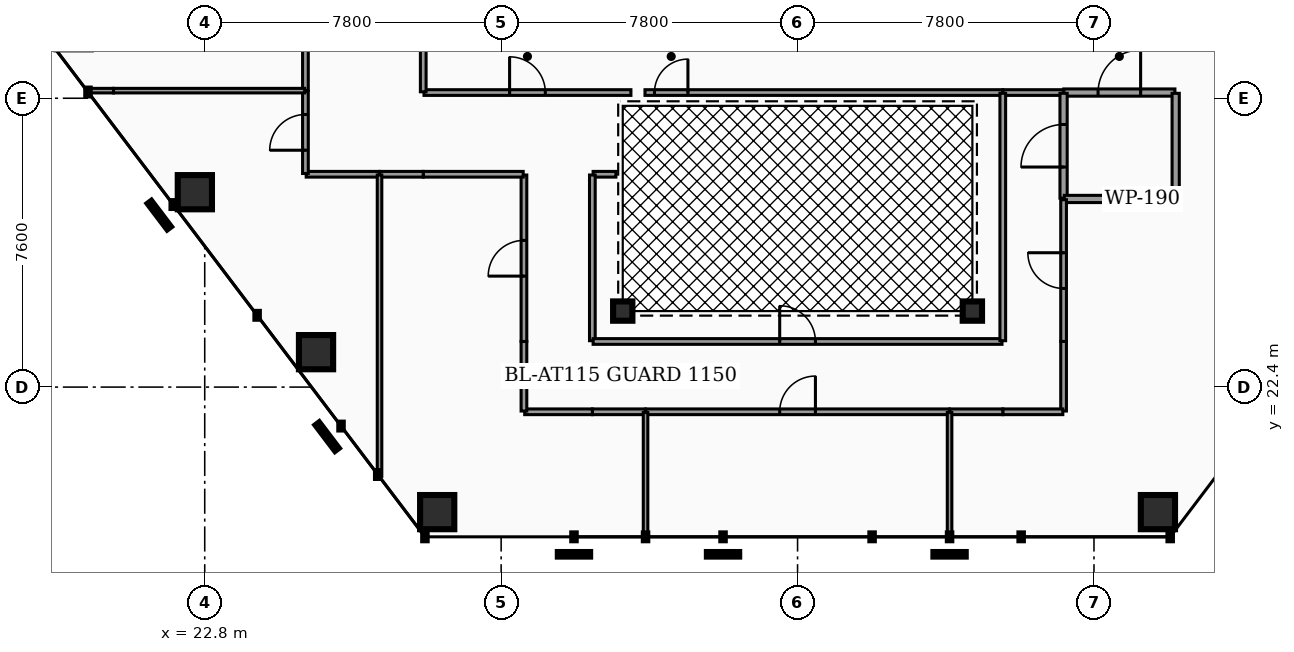
"""IFC4 building model, lengths in metres.
Left out: names, types, materials, properties, quantities, classifications, styles, units other than length and angle.
Written with IfcOpenShell. Run it as: python <this file> out.ifc"""

import sys

from ifc_helpers import new_model, si_unit, direction, frame, frame_2d, origin, origin_2d, place, context, subcontext, project, spatial, rectangle, hollow_rectangle, hollow_circle, extrude, element, fill, save


model = new_model("IFC4")
c1 = context("Model", 3, precision=1e-05, world=origin(), true_north=direction((0.0, 1.0)))
c2 = subcontext(c1, "Body", "Model", "MODEL_VIEW")
j1 = project(units=[si_unit("LENGTHUNIT", "METRE"), si_unit("PLANEANGLEUNIT", "RADIAN")], contexts=[c1])
p1 = place(None, origin())
s1 = spatial("IfcSite", under=j1, at=p1, CompositionType="ELEMENT")
p2 = place(p1, origin())
s2 = spatial("IfcBuilding", under=s1, at=p2, CompositionType="ELEMENT")
p3 = place(p2, frame((0.0, 0.0, 88.74)))
s3 = spatial("IfcBuildingStorey", under=s2, at=p3, CompositionType="ELEMENT", Elevation=88.74)
for number, where, z_axis, x_axis in (
    (1, (22.54, 27.528, 0.0), (0.0, 0.0, 1.0), (1.0, 0.0, 0.0)),
    (2, (25.729, 23.319, 0.0), (0.0, 0.0, 1.0), (1.0, 0.0, 0.0)),
    (3, (28.917, 19.11, 0.0), (0.0, 0.0, 1.0), (1.0, 0.0, 0.0)),
    (4, (47.883, 19.11, 0.0), (0.0, 0.0, 1.0), (1.0, 0.0, 0.0)),
):
    element("IfcColumn", number, at=place(p3, frame(where, z_axis=z_axis, x_axis=x_axis)), inside=s3, PredefinedType="COLUMN", context=c2, shape_type="SweptSolid", body=[
        extrude(hollow_rectangle(XDim=0.9, YDim=0.9, WallThickness=0.045, at=origin_2d()), origin(), (0.0, 0.0, 1.0), 3.82),
    ])
for number, where, z_axis, x_axis in (
    (5, (33.8, 24.4, 0.0), (0.0, 0.0, 1.0), (1.0, 0.0, 0.0)),
    (6, (43.0, 24.4, 0.0), (0.0, 0.0, 1.0), (1.0, 0.0, 0.0)),
):
    element("IfcColumn", number, at=place(p3, frame(where, z_axis=z_axis, x_axis=x_axis)), inside=s3, PredefinedType="COLUMN", context=c2, shape_type="SweptSolid", body=[
        extrude(hollow_circle(Radius=0.254, WallThickness=0.02, at=origin_2d()), origin(), (0.0, 0.0, 1.0), 3.82),
    ])
p4 = place(p3, frame((45.405, 30.15, 0.0), z_axis=(0.0, 0.0, 1.0), x_axis=(1.0, 0.0, 0.0)))
e7 = element("IfcWall", 7, at=p4, inside=s3, PredefinedType="PARTITIONING", context=c2, shape_type="SweptSolid", body=[
    extrude(rectangle(XDim=2.925, YDim=0.19, at=frame_2d((1.462, 0.0))), origin(), (0.0, 0.0, 1.0), 2.777),
])
p5 = place(p4, frame((0.903, 0.0, 0.0)))
e8 = element("IfcOpeningElement", 8, at=p5, cuts=e7, PredefinedType="OPENING", context=c2, shape_type="SweptSolid", body=[
    extrude(rectangle(XDim=1.12, YDim=2.05, at=frame_2d((0.56, 1.025))), frame((0.0, 0.105, 0.0), z_axis=(0.0, -1.0, 0.0), x_axis=(1.0, 0.0, 0.0)), (0.0, 0.0, 1.0), 0.21),
])
p6 = place(p3, frame((43.805, 30.15, 0.0), z_axis=(0.0, 0.0, 1.0), x_axis=(1.0, 0.0, 0.0)))
e9 = element("IfcWall", 9, at=p6, inside=s3, PredefinedType="PARTITIONING", context=c2, shape_type="SweptSolid", body=[
    extrude(rectangle(XDim=1.59, YDim=0.15, at=frame_2d((0.795, 0.0))), origin(), (0.0, 0.0, 1.0), 2.777),
])
p7 = place(p3, frame((28.57, 30.15, 0.0), z_axis=(0.0, 0.0, 1.0), x_axis=(1.0, 0.0, 0.0)))
e10 = element("IfcWall", 10, at=p7, inside=s3, PredefinedType="PARTITIONING", context=c2, shape_type="SweptSolid", body=[
    extrude(rectangle(XDim=5.445, YDim=0.15, at=frame_2d((2.722, 0.0))), origin(), (0.0, 0.0, 1.0), 2.777),
])
p8 = place(p7, frame((2.252, 0.0, 0.0)))
e11 = element("IfcOpeningElement", 11, at=p8, cuts=e10, PredefinedType="OPENING", context=c2, shape_type="SweptSolid", body=[
    extrude(rectangle(XDim=0.94, YDim=2.05, at=frame_2d((0.47, 1.025))), frame((0.0, 0.085, 0.0), z_axis=(0.0, -1.0, 0.0), x_axis=(1.0, 0.0, 0.0)), (0.0, 0.0, 1.0), 0.17),
])
p9 = place(p3, frame((28.55, 30.17, 0.0), z_axis=(0.0, 0.0, 1.0), x_axis=(0.0, 1.0, 0.0)))
e12 = element("IfcWall", 12, at=p9, inside=s3, PredefinedType="PARTITIONING", context=c2, shape_type="SweptSolid", body=[
    extrude(rectangle(XDim=3.065, YDim=0.15, at=frame_2d((1.533, 0.0))), origin(), (0.0, 0.0, 1.0), 2.777),
])
p10 = place(p3, frame((34.385, 30.15, 0.0), z_axis=(0.0, 0.0, 1.0), x_axis=(1.0, 0.0, 0.0)))
e13 = element("IfcWall", 13, at=p10, inside=s3, PredefinedType="PARTITIONING", context=c2, shape_type="SweptSolid", body=[
    extrude(rectangle(XDim=9.41, YDim=0.15, at=frame_2d((4.705, 0.0))), origin(), (0.0, 0.0, 1.0), 2.777),
])
p11 = place(p10, frame((0.25, 0.0, 0.0)))
e14 = element("IfcOpeningElement", 14, at=p11, cuts=e13, PredefinedType="OPENING", context=c2, shape_type="SweptSolid", body=[
    extrude(rectangle(XDim=0.88, YDim=2.05, at=frame_2d((0.44, 1.025))), frame((0.0, 0.085, 0.0), z_axis=(0.0, -1.0, 0.0), x_axis=(1.0, 0.0, 0.0)), (0.0, 0.0, 1.0), 0.17),
])
p12 = place(p3, frame((45.4, 27.37, 0.0), z_axis=(0.0, 0.0, 1.0), x_axis=(0.0, 1.0, 0.0)))
e15 = element("IfcWall", 15, at=p12, inside=s3, PredefinedType="PARTITIONING", context=c2, shape_type="SweptSolid", body=[
    extrude(rectangle(XDim=2.76, YDim=0.19, at=frame_2d((1.38, 0.0))), origin(), (0.0, 0.0, 1.0), 2.777),
])
p13 = place(p12, frame((0.82, 0.0, 0.0)))
e16 = element("IfcOpeningElement", 16, at=p13, cuts=e15, PredefinedType="OPENING", context=c2, shape_type="SweptSolid", body=[
    extrude(rectangle(XDim=1.12, YDim=2.05, at=frame_2d((0.56, 1.025))), frame((0.0, 0.105, 0.0), z_axis=(0.0, -1.0, 0.0), x_axis=(1.0, 0.0, 0.0)), (0.0, 0.0, 1.0), 0.21),
])
p14 = place(p3, frame((45.42, 27.35, 0.0), z_axis=(0.0, 0.0, 1.0), x_axis=(1.0, 0.0, 0.0)))
e17 = element("IfcWall", 17, at=p14, inside=s3, PredefinedType="PARTITIONING", context=c2, shape_type="SweptSolid", body=[
    extrude(rectangle(XDim=2.91, YDim=0.19, at=frame_2d((1.455, 0.0))), origin(), (0.0, 0.0, 1.0), 2.777),
])
p15 = place(p3, frame((48.35, 27.37, 0.0), z_axis=(0.0, 0.0, 1.0), x_axis=(0.0, 1.0, 0.0)))
e18 = element("IfcWall", 18, at=p15, inside=s3, PredefinedType="PARTITIONING", context=c2, shape_type="SweptSolid", body=[
    extrude(rectangle(XDim=2.76, YDim=0.19, at=frame_2d((1.38, 0.0))), origin(), (0.0, 0.0, 1.0), 2.777),
])
p16 = place(p3, frame((34.405, 21.75, 0.0), z_axis=(0.0, 0.0, 1.0), x_axis=(1.0, 0.0, 0.0)))
e19 = element("IfcWall", 19, at=p16, inside=s3, PredefinedType="PARTITIONING", context=c2, shape_type="SweptSolid", body=[
    extrude(rectangle(XDim=7.99, YDim=0.15, at=frame_2d((3.995, 0.0))), origin(), (0.0, 0.0, 1.0), 2.777),
])
p17 = place(p16, frame((3.525, 0.0, 0.0)))
e20 = element("IfcOpeningElement", 20, at=p17, cuts=e19, PredefinedType="OPENING", context=c2, shape_type="SweptSolid", body=[
    extrude(rectangle(XDim=0.94, YDim=2.05, at=frame_2d((0.47, 1.025))), frame((0.0, 0.085, 0.0), z_axis=(0.0, -1.0, 0.0), x_axis=(1.0, 0.0, 0.0)), (0.0, 0.0, 1.0), 0.17),
])
p18 = place(p3, frame((33.0, 21.75, 0.0), z_axis=(0.0, 0.0, 1.0), x_axis=(1.0, 0.0, 0.0)))
e21 = element("IfcWall", 21, at=p18, inside=s3, PredefinedType="PARTITIONING", context=c2, shape_type="SweptSolid", body=[
    extrude(rectangle(XDim=1.395, YDim=0.15, at=frame_2d((0.698, 0.0))), origin(), (0.0, 0.0, 1.0), 2.777),
])
p19 = place(p3, frame((31.22, 21.75, 0.0), z_axis=(0.0, 0.0, 1.0), x_axis=(1.0, 0.0, 0.0)))
e22 = element("IfcWall", 22, at=p19, inside=s3, PredefinedType="PARTITIONING", context=c2, shape_type="SweptSolid", body=[
    extrude(rectangle(XDim=1.78, YDim=0.15, at=frame_2d((0.89, 0.0))), origin(), (0.0, 0.0, 1.0), 2.777),
])
p20 = place(p3, frame((31.2, 21.77, 0.0), z_axis=(0.0, 0.0, 1.0), x_axis=(0.0, 1.0, 0.0)))
e23 = element("IfcWall", 23, at=p20, inside=s3, PredefinedType="PARTITIONING", context=c2, shape_type="SweptSolid", body=[
    extrude(rectangle(XDim=1.83, YDim=0.15, at=frame_2d((0.915, 0.0))), origin(), (0.0, 0.0, 1.0), 2.777),
])
p21 = place(p3, frame((31.2, 23.6, 0.0), z_axis=(0.0, 0.0, 1.0), x_axis=(0.0, 1.0, 0.0)))
e24 = element("IfcWall", 24, at=p21, inside=s3, PredefinedType="PARTITIONING", context=c2, shape_type="SweptSolid", body=[
    extrude(rectangle(XDim=4.38, YDim=0.15, at=frame_2d((2.19, 0.0))), origin(), (0.0, 0.0, 1.0), 2.777),
])
p22 = place(p21, frame((1.72, 0.0, 0.0)))
e25 = element("IfcOpeningElement", 25, at=p22, cuts=e24, PredefinedType="OPENING", context=c2, shape_type="SweptSolid", body=[
    extrude(rectangle(XDim=0.94, YDim=2.05, at=frame_2d((0.47, 1.025))), frame((0.0, 0.085, 0.0), z_axis=(0.0, -1.0, 0.0), x_axis=(1.0, 0.0, 0.0)), (0.0, 0.0, 1.0), 0.17),
])
p23 = place(p3, frame((28.55, 28.0, 0.0), z_axis=(0.0, 0.0, 1.0), x_axis=(1.0, 0.0, 0.0)))
e26 = element("IfcWall", 26, at=p23, inside=s3, PredefinedType="PARTITIONING", context=c2, shape_type="SweptSolid", body=[
    extrude(rectangle(XDim=2.63, YDim=0.15, at=frame_2d((1.315, 0.0))), origin(), (0.0, 0.0, 1.0), 2.777),
])
p24 = place(p3, frame((27.405, 28.0, 0.0), z_axis=(0.0, 0.0, 1.0), x_axis=(1.0, 0.0, 0.0)))
e27 = element("IfcWall", 27, at=p24, inside=s3, PredefinedType="PARTITIONING", context=c2, shape_type="SweptSolid", body=[
    extrude(rectangle(XDim=1.145, YDim=0.15, at=frame_2d((0.573, 0.0))), origin(), (0.0, 0.0, 1.0), 2.777),
])
p25 = place(p3, frame((45.4, 23.6, 0.0), z_axis=(0.0, 0.0, 1.0), x_axis=(0.0, 1.0, 0.0)))
e28 = element("IfcWall", 28, at=p25, inside=s3, PredefinedType="PARTITIONING", context=c2, shape_type="SweptSolid", body=[
    extrude(rectangle(XDim=3.73, YDim=0.15, at=frame_2d((1.865, 0.0))), origin(), (0.0, 0.0, 1.0), 2.777),
])
p26 = place(p25, frame((1.395, 0.0, 0.0)))
e29 = element("IfcOpeningElement", 29, at=p26, cuts=e28, PredefinedType="OPENING", context=c2, shape_type="SweptSolid", body=[
    extrude(rectangle(XDim=0.94, YDim=2.05, at=frame_2d((0.47, 1.025))), frame((0.0, 0.085, 0.0), z_axis=(0.0, -1.0, 0.0), x_axis=(1.0, 0.0, 0.0)), (0.0, 0.0, 1.0), 0.17),
])
p27 = place(p3, frame((45.4, 21.77, 0.0), z_axis=(0.0, 0.0, 1.0), x_axis=(0.0, 1.0, 0.0)))
e30 = element("IfcWall", 30, at=p27, inside=s3, PredefinedType="PARTITIONING", context=c2, shape_type="SweptSolid", body=[
    extrude(rectangle(XDim=1.83, YDim=0.15, at=frame_2d((0.915, 0.0))), origin(), (0.0, 0.0, 1.0), 2.777),
])
p28 = place(p3, frame((43.8, 21.75, 0.0), z_axis=(0.0, 0.0, 1.0), x_axis=(1.0, 0.0, 0.0)))
e31 = element("IfcWall", 31, at=p28, inside=s3, PredefinedType="PARTITIONING", context=c2, shape_type="SweptSolid", body=[
    extrude(rectangle(XDim=1.58, YDim=0.15, at=frame_2d((0.79, 0.0))), origin(), (0.0, 0.0, 1.0), 2.777),
])
p29 = place(p3, frame((42.405, 21.75, 0.0), z_axis=(0.0, 0.0, 1.0), x_axis=(1.0, 0.0, 0.0)))
e32 = element("IfcWall", 32, at=p29, inside=s3, PredefinedType="PARTITIONING", context=c2, shape_type="SweptSolid", body=[
    extrude(rectangle(XDim=1.395, YDim=0.15, at=frame_2d((0.698, 0.0))), origin(), (0.0, 0.0, 1.0), 2.777),
])
p30 = place(p3, frame((25.47, 28.0, 0.0), z_axis=(0.0, 0.0, 1.0), x_axis=(1.0, 0.0, 0.0)))
e33 = element("IfcWall", 33, at=p30, inside=s3, PredefinedType="PARTITIONING", context=c2, shape_type="SweptSolid", body=[
    extrude(rectangle(XDim=1.925, YDim=0.15, at=frame_2d((0.962, 0.0))), origin(), (0.0, 0.0, 1.0), 2.777),
])
p31 = place(p3, frame((25.45, 28.02, 0.0), z_axis=(0.0, 0.0, 1.0), x_axis=(0.0, 1.0, 0.0)))
e34 = element("IfcWall", 34, at=p31, inside=s3, PredefinedType="PARTITIONING", context=c2, shape_type="SweptSolid", body=[
    extrude(rectangle(XDim=2.165, YDim=0.15, at=frame_2d((1.083, 0.0))), origin(), (0.0, 0.0, 1.0), 2.777),
])
p32 = place(p31, frame((0.613, 0.0, 0.0)))
e35 = element("IfcOpeningElement", 35, at=p32, cuts=e34, PredefinedType="OPENING", context=c2, shape_type="SweptSolid", body=[
    extrude(rectangle(XDim=0.94, YDim=2.05, at=frame_2d((0.47, 1.025))), frame((0.0, 0.085, 0.0), z_axis=(0.0, -1.0, 0.0), x_axis=(1.0, 0.0, 0.0)), (0.0, 0.0, 1.0), 0.17),
])
p33 = place(p3, frame((25.45, 30.205, 0.0), z_axis=(0.0, 0.0, 1.0), x_axis=(0.0, 1.0, 0.0)))
e36 = element("IfcWall", 36, at=p33, inside=s3, PredefinedType="PARTITIONING", context=c2, shape_type="SweptSolid", body=[
    extrude(rectangle(XDim=3.08, YDim=0.15, at=frame_2d((1.54, 0.0))), origin(), (0.0, 0.0, 1.0), 2.777),
])
p34 = place(p33, frame((1.07, 0.0, 0.0)))
e37 = element("IfcOpeningElement", 37, at=p34, cuts=e36, PredefinedType="OPENING", context=c2, shape_type="SweptSolid", body=[
    extrude(rectangle(XDim=0.94, YDim=2.05, at=frame_2d((0.47, 1.025))), frame((0.0, 0.085, 0.0), z_axis=(0.0, -1.0, 0.0), x_axis=(1.0, 0.0, 0.0)), (0.0, 0.0, 1.0), 0.17),
])
p35 = place(p3, frame((33.02, 28.0, 0.0), z_axis=(0.0, 0.0, 1.0), x_axis=(1.0, 0.0, 0.0)))
e38 = element("IfcWall", 38, at=p35, inside=s3, PredefinedType="PARTITIONING", context=c2, shape_type="SweptSolid", body=[
    extrude(rectangle(XDim=0.6, YDim=0.15, at=frame_2d((0.3, 0.0))), origin(), (0.0, 0.0, 1.0), 2.777),
])
p36 = place(p3, frame((33.0, 23.62, 0.0), z_axis=(0.0, 0.0, 1.0), x_axis=(0.0, 1.0, 0.0)))
e39 = element("IfcWall", 39, at=p36, inside=s3, PredefinedType="PARTITIONING", context=c2, shape_type="SweptSolid", body=[
    extrude(rectangle(XDim=4.36, YDim=0.15, at=frame_2d((2.18, 0.0))), origin(), (0.0, 0.0, 1.0), 2.777),
])
p37 = place(p3, frame((33.02, 23.6, 0.0), z_axis=(0.0, 0.0, 1.0), x_axis=(1.0, 0.0, 0.0)))
e40 = element("IfcWall", 40, at=p37, inside=s3, PredefinedType="PARTITIONING", context=c2, shape_type="SweptSolid", body=[
    extrude(rectangle(XDim=10.76, YDim=0.15, at=frame_2d((5.38, 0.0))), origin(), (0.0, 0.0, 1.0), 2.777),
])
p38 = place(p37, frame((4.91, 0.0, 0.0)))
e41 = element("IfcOpeningElement", 41, at=p38, cuts=e40, PredefinedType="OPENING", context=c2, shape_type="SweptSolid", body=[
    extrude(rectangle(XDim=0.94, YDim=2.05, at=frame_2d((0.47, 1.025))), frame((0.0, 0.085, 0.0), z_axis=(0.0, -1.0, 0.0), x_axis=(1.0, 0.0, 0.0)), (0.0, 0.0, 1.0), 0.17),
])
p39 = place(p3, frame((43.8, 23.62, 0.0), z_axis=(0.0, 0.0, 1.0), x_axis=(0.0, 1.0, 0.0)))
e42 = element("IfcWall", 42, at=p39, inside=s3, PredefinedType="PARTITIONING", context=c2, shape_type="SweptSolid", body=[
    extrude(rectangle(XDim=6.51, YDim=0.15, at=frame_2d((3.255, 0.0))), origin(), (0.0, 0.0, 1.0), 2.777),
])
for number, where, z_axis, x_axis in (
    (43, (34.4, 18.475, 0.0), (0.0, 0.0, 1.0), (0.0, 1.0, 0.0)),
    (44, (42.4, 18.475, 0.0), (0.0, 0.0, 1.0), (0.0, 1.0, 0.0)),
):
    element("IfcWall", number, at=place(p3, frame(where, z_axis=z_axis, x_axis=x_axis)), inside=s3, PredefinedType="PARTITIONING", context=c2, shape_type="SweptSolid", body=[
        extrude(rectangle(XDim=3.255, YDim=0.12, at=frame_2d((1.627, 0.0))), origin(), (0.0, 0.0, 1.0), 2.777),
    ])
p40 = place(p3, frame((27.4, 20.052, 0.0), z_axis=(0.0, 0.0, 1.0), x_axis=(0.0, 1.0, 0.0)))
e45 = element("IfcWall", 45, at=p40, inside=s3, PredefinedType="PARTITIONING", context=c2, shape_type="SweptSolid", body=[
    extrude(rectangle(XDim=7.928, YDim=0.12, at=frame_2d((3.964, 0.0))), origin(), (0.0, 0.0, 1.0), 2.777),
])
p41 = place(p3, frame((19.716, 30.2, 0.0), z_axis=(0.0, 0.0, 1.0), x_axis=(1.0, 0.0, 0.0)))
e46 = element("IfcWall", 46, at=p41, inside=s3, PredefinedType="PARTITIONING", context=c2, shape_type="SweptSolid", body=[
    extrude(rectangle(XDim=0.684, YDim=0.12, at=frame_2d((0.342, 0.0))), origin(), (0.0, 0.0, 1.0), 2.777),
])
p42 = place(p3, frame((20.4, 30.2, 0.0), z_axis=(0.0, 0.0, 1.0), x_axis=(1.0, 0.0, 0.0)))
e47 = element("IfcWall", 47, at=p42, inside=s3, PredefinedType="PARTITIONING", context=c2, shape_type="SweptSolid", body=[
    extrude(rectangle(XDim=5.03, YDim=0.12, at=frame_2d((2.515, 0.0))), origin(), (0.0, 0.0, 1.0), 2.777),
])
p43 = place(p5, origin())
e48 = element("IfcDoor", 48, at=p43, inside=s3, OperationType="SINGLE_SWING_RIGHT", PredefinedType="DOOR", context=c2, shape_type="SweptSolid", body=[
    extrude(rectangle(XDim=1.12, YDim=2.05, at=frame_2d((0.56, 1.025))), frame((0.0, 0.025, 0.0), z_axis=(0.0, -1.0, 0.0), x_axis=(1.0, 0.0, 0.0)), (0.0, 0.0, 1.0), 0.05),
])
fill(e8, e48)
p44 = place(p8, origin())
e49 = element("IfcDoor", 49, at=p44, inside=s3, OperationType="SINGLE_SWING_LEFT", PredefinedType="DOOR", context=c2, shape_type="SweptSolid", body=[
    extrude(rectangle(XDim=0.94, YDim=2.05, at=frame_2d((0.47, 1.025))), frame((0.0, 0.025, 0.0), z_axis=(0.0, -1.0, 0.0), x_axis=(1.0, 0.0, 0.0)), (0.0, 0.0, 1.0), 0.05),
])
fill(e11, e49)
p45 = place(p11, origin())
e50 = element("IfcDoor", 50, at=p45, inside=s3, OperationType="SINGLE_SWING_RIGHT", PredefinedType="DOOR", context=c2, shape_type="SweptSolid", body=[
    extrude(rectangle(XDim=0.88, YDim=2.05, at=frame_2d((0.44, 1.025))), frame((0.0, 0.025, 0.0), z_axis=(0.0, -1.0, 0.0), x_axis=(1.0, 0.0, 0.0)), (0.0, 0.0, 1.0), 0.05),
])
fill(e14, e50)
p46 = place(p13, origin())
e51 = element("IfcDoor", 51, at=p46, inside=s3, OperationType="SINGLE_SWING_LEFT", PredefinedType="DOOR", context=c2, shape_type="SweptSolid", body=[
    extrude(rectangle(XDim=1.12, YDim=2.05, at=frame_2d((0.56, 1.025))), frame((0.0, 0.025, 0.0), z_axis=(0.0, -1.0, 0.0), x_axis=(1.0, 0.0, 0.0)), (0.0, 0.0, 1.0), 0.05),
])
fill(e16, e51)
p47 = place(p17, origin())
e52 = element("IfcDoor", 52, at=p47, inside=s3, OperationType="SINGLE_SWING_RIGHT", PredefinedType="DOOR", context=c2, shape_type="SweptSolid", body=[
    extrude(rectangle(XDim=0.94, YDim=2.05, at=frame_2d((0.47, 1.025))), frame((0.0, 0.025, 0.0), z_axis=(0.0, -1.0, 0.0), x_axis=(1.0, 0.0, 0.0)), (0.0, 0.0, 1.0), 0.05),
])
fill(e20, e52)
p48 = place(p22, origin())
e53 = element("IfcDoor", 53, at=p48, inside=s3, OperationType="SINGLE_SWING_LEFT", PredefinedType="DOOR", context=c2, shape_type="SweptSolid", body=[
    extrude(rectangle(XDim=0.94, YDim=2.05, at=frame_2d((0.47, 1.025))), frame((0.0, 0.025, 0.0), z_axis=(0.0, -1.0, 0.0), x_axis=(1.0, 0.0, 0.0)), (0.0, 0.0, 1.0), 0.05),
])
fill(e25, e53)
p49 = place(p26, origin())
e54 = element("IfcDoor", 54, at=p49, inside=s3, OperationType="SINGLE_SWING_RIGHT", PredefinedType="DOOR", context=c2, shape_type="SweptSolid", body=[
    extrude(rectangle(XDim=0.94, YDim=2.05, at=frame_2d((0.47, 1.025))), frame((0.0, 0.025, 0.0), z_axis=(0.0, -1.0, 0.0), x_axis=(1.0, 0.0, 0.0)), (0.0, 0.0, 1.0), 0.05),
])
fill(e29, e54)
p50 = place(p32, origin())
e55 = element("IfcDoor", 55, at=p50, inside=s3, OperationType="SINGLE_SWING_LEFT", PredefinedType="DOOR", context=c2, shape_type="SweptSolid", body=[
    extrude(rectangle(XDim=0.94, YDim=2.05, at=frame_2d((0.47, 1.025))), frame((0.0, 0.025, 0.0), z_axis=(0.0, -1.0, 0.0), x_axis=(1.0, 0.0, 0.0)), (0.0, 0.0, 1.0), 0.05),
])
fill(e35, e55)
p51 = place(p38, origin())
e56 = element("IfcDoor", 56, at=p51, inside=s3, OperationType="SINGLE_SWING_LEFT", PredefinedType="DOOR", context=c2, shape_type="SweptSolid", body=[
    extrude(rectangle(XDim=0.94, YDim=2.05, at=frame_2d((0.47, 1.025))), frame((0.0, 0.025, 0.0), z_axis=(0.0, -1.0, 0.0), x_axis=(1.0, 0.0, 0.0)), (0.0, 0.0, 1.0), 0.05),
])
fill(e41, e56)
save(model, sys.argv[1])
